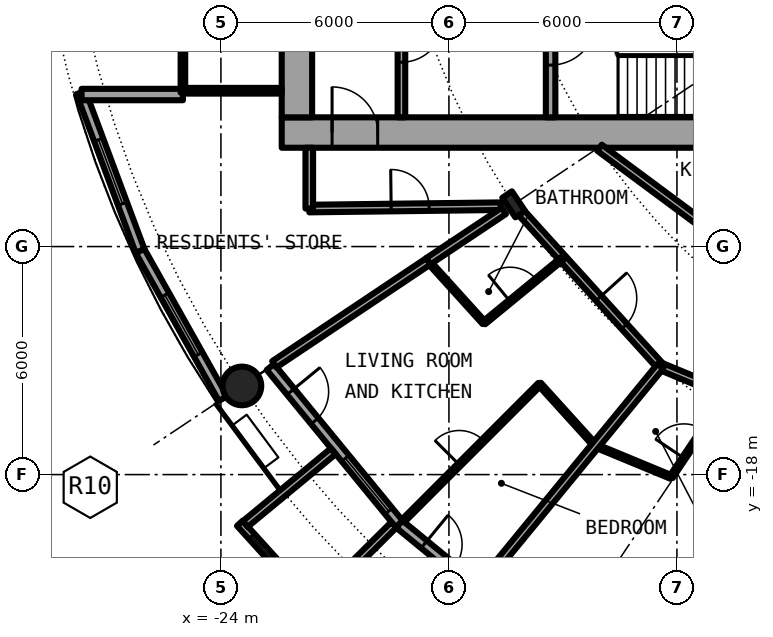
"""IFC4 building model, lengths in metres.
Left out: names, types, materials, properties, quantities, classifications, styles, units other than length and angle.
Written with IfcOpenShell. Run it as: python <this file> out.ifc"""

import sys

from ifc_helpers import new_model, si_unit, direction, frame, frame_2d, origin, origin_2d, place, context, subcontext, project, spatial, rectangle, circle, hollow_circle, i_section, extrude, element, fill, save


model = new_model("IFC4")
c1 = context("Model", 3, precision=1e-05, world=origin(), true_north=direction((0.0, 1.0)))
c2 = subcontext(c1, "Body", "Model", "MODEL_VIEW")
j1 = project(units=[si_unit("LENGTHUNIT", "METRE"), si_unit("PLANEANGLEUNIT", "RADIAN")], contexts=[c1])
p1 = place(None, origin())
s1 = spatial("IfcSite", under=j1, at=p1, CompositionType="ELEMENT")
p2 = place(p1, origin())
s2 = spatial("IfcBuilding", under=s1, at=p2, CompositionType="ELEMENT")
p3 = place(p2, frame((0.0, 0.0, 50.25)))
s3 = spatial("IfcBuildingStorey", under=s2, at=p3, CompositionType="ELEMENT", Elevation=50.25)
p4 = place(p3, frame((-23.448, -15.667, 0.0), z_axis=(0.0, 0.0, 1.0), x_axis=(1.0, 0.0, 0.0)))
e1 = element("IfcColumn", 1, at=p4, inside=s3, PredefinedType="COLUMN", context=c2, shape_type="SweptSolid", body=[
    extrude(hollow_circle(Radius=0.508, WallThickness=0.05, at=origin_2d()), origin(), (0.0, 0.0, 1.0), 3.05),
])
p5 = place(p3, frame((-16.297, -10.889, 0.0), z_axis=(0.0, 0.0, 1.0), x_axis=(-0.831469612303, -0.55557023302, 0.0)))
e2 = element("IfcColumn", 2, at=p5, inside=s3, PredefinedType="COLUMN", context=c2, shape_type="SweptSolid", body=[
    extrude(i_section(OverallWidth=0.305, OverallDepth=0.62, WebThickness=0.021, FlangeThickness=0.04, FilletRadius=0.027, at=origin_2d()), origin(), (0.0, 0.0, 1.0), 3.05),
])
p6 = place(p3, frame((-22.699, -15.167, 0.0), z_axis=(0.0, 0.0, 1.0), x_axis=(0.634382322723, -0.773019449054, 0.0)))
e3 = element("IfcWall", 3, at=p6, inside=s3, PredefinedType="SOLIDWALL", context=c2, shape_type="SweptSolid", body=[
    extrude(rectangle(XDim=5.352, YDim=0.25, at=frame_2d((2.676, 0.0))), origin(), (0.0, 0.0, 1.0), 2.7),
])
p7 = place(p6, frame((0.841, 0.0, 0.0)))
e4 = element("IfcOpeningElement", 4, at=p7, cuts=e3, PredefinedType="OPENING", context=c2, shape_type="SweptSolid", body=[
    extrude(rectangle(XDim=1.0, YDim=2.2, at=frame_2d((0.5, 1.1))), frame((0.0, 0.135, 0.0), z_axis=(0.0, -1.0, 0.0), x_axis=(1.0, 0.0, 0.0)), (0.0, 0.0, 1.0), 0.27),
])
p8 = place(p6, frame((3.111, 0.0, 0.3)))
e5 = element("IfcOpeningElement", 5, at=p8, cuts=e3, PredefinedType="OPENING", context=c2, shape_type="SweptSolid", body=[
    extrude(rectangle(XDim=1.8, YDim=2.1, at=frame_2d((0.9, 1.05))), frame((0.0, 0.135, 0.0), z_axis=(0.0, -1.0, 0.0), x_axis=(1.0, 0.0, 0.0)), (0.0, 0.0, 1.0), 0.27),
])
p9 = place(p3, frame((-23.503, -19.282, -0.03), z_axis=(0.0, 0.0, 1.0), x_axis=(0.671506829416, -0.740998365753, 0.0)))
e6 = element("IfcWall", 6, at=p9, inside=s3, PredefinedType="SOLIDWALL", context=c2, shape_type="SweptSolid", body=[
    extrude(rectangle(XDim=2.993, YDim=0.2, at=frame_2d((1.497, 0.0))), origin(), (0.0, 0.0, 1.0), 2.73),
])
p10 = place(p9, frame((0.457, 0.0, 0.33)))
e7 = element("IfcOpeningElement", 7, at=p10, cuts=e6, PredefinedType="OPENING", context=c2, shape_type="SweptSolid", body=[
    extrude(circle(Radius=1.04, at=frame_2d((1.04, 1.04))), frame((0.0, 0.11, 0.0), z_axis=(0.0, -1.0, 0.0), x_axis=(1.0, 0.0, 0.0)), (0.0, 0.0, 1.0), 0.22),
])
p11 = place(p3, frame((-21.041, -17.384, -0.03), z_axis=(0.0, 0.0, 1.0), x_axis=(-0.770784861449, -0.63709551667, 0.0)))
e8 = element("IfcWall", 8, at=p11, inside=s3, PredefinedType="SOLIDWALL", context=c2, shape_type="SweptSolid", body=[
    extrude(rectangle(XDim=3.006, YDim=0.2, at=frame_2d((1.503, 0.0))), origin(), (0.0, 0.0, 1.0), 2.73),
])
p12 = place(p3, frame((-19.45, -19.323, -0.03), z_axis=(0.0, 0.0, 1.0), x_axis=(-0.709727076896, -0.704476739375, 0.0)))
e9 = element("IfcWall", 9, at=p12, inside=s3, PredefinedType="SOLIDWALL", context=c2, shape_type="SweptSolid", body=[
    extrude(rectangle(XDim=2.883, YDim=0.2, at=frame_2d((1.441, 0.0))), origin(), (0.0, 0.0, 1.0), 2.73),
])
p13 = place(p3, frame((-19.304, -19.304, 0.0), z_axis=(0.0, 0.0, 1.0), x_axis=(0.773019449054, -0.634382322723, 0.0)))
e10 = element("IfcWall", 10, at=p13, inside=s3, PredefinedType="SOLIDWALL", context=c2, shape_type="SweptSolid", body=[
    extrude(rectangle(XDim=5.352, YDim=0.25, at=frame_2d((2.676, 0.0))), origin(), (0.0, 0.0, 1.0), 2.7),
])
p14 = place(p13, frame((0.841, 0.0, 0.0)))
e11 = element("IfcOpeningElement", 11, at=p14, cuts=e10, PredefinedType="OPENING", context=c2, shape_type="SweptSolid", body=[
    extrude(rectangle(XDim=1.0, YDim=2.2, at=frame_2d((0.5, 1.1))), frame((0.0, 0.135, 0.0), z_axis=(0.0, -1.0, 0.0), x_axis=(1.0, 0.0, 0.0)), (0.0, 0.0, 1.0), 0.27),
])
p15 = place(p13, frame((3.111, 0.0, 0.3)))
e12 = element("IfcOpeningElement", 12, at=p15, cuts=e10, PredefinedType="OPENING", context=c2, shape_type="SweptSolid", body=[
    extrude(rectangle(XDim=1.8, YDim=2.1, at=frame_2d((0.9, 1.05))), frame((0.0, 0.135, 0.0), z_axis=(0.0, -1.0, 0.0), x_axis=(1.0, 0.0, 0.0)), (0.0, 0.0, 1.0), 0.27),
])
p16 = place(p3, frame((-27.682, -7.945, 0.0), z_axis=(0.0, 0.0, 1.0), x_axis=(0.349247811493, -0.937030397675, 0.0)))
e13 = element("IfcWall", 13, at=p16, inside=s3, PredefinedType="SOLIDWALL", context=c2, shape_type="SweptSolid", body=[
    extrude(rectangle(XDim=4.452, YDim=0.25, at=frame_2d((2.226, 0.0))), origin(), (0.0, 0.0, 1.0), 2.7),
])
p17 = place(p16, frame((1.327, 0.0, 0.3)))
e14 = element("IfcOpeningElement", 14, at=p17, cuts=e13, PredefinedType="OPENING", context=c2, shape_type="SweptSolid", body=[
    extrude(rectangle(XDim=1.8, YDim=2.1, at=frame_2d((0.9, 1.05))), frame((0.0, 0.135, 0.0), z_axis=(0.0, -1.0, 0.0), x_axis=(1.0, 0.0, 0.0)), (0.0, 0.0, 1.0), 0.27),
])
p18 = place(p3, frame((-26.127, -12.117, 0.0), z_axis=(0.0, 0.0, 1.0), x_axis=(0.489696356642, -0.871893042919, 0.0)))
e15 = element("IfcWall", 15, at=p18, inside=s3, PredefinedType="SOLIDWALL", context=c2, shape_type="SweptSolid", body=[
    extrude(rectangle(XDim=4.454, YDim=0.25, at=frame_2d((2.227, 0.0))), origin(), (0.0, 0.0, 1.0), 2.7),
])
p19 = place(p18, frame((1.327, 0.0, 0.3)))
e16 = element("IfcOpeningElement", 16, at=p19, cuts=e15, PredefinedType="OPENING", context=c2, shape_type="SweptSolid", body=[
    extrude(rectangle(XDim=1.8, YDim=2.1, at=frame_2d((0.9, 1.05))), frame((0.0, 0.135, 0.0), z_axis=(0.0, -1.0, 0.0), x_axis=(1.0, 0.0, 0.0)), (0.0, 0.0, 1.0), 0.27),
])
p20 = place(p3, frame((-25.0, -8.0, 0.0), z_axis=(0.0, 0.0, 1.0), x_axis=(-1.0, 0.0, 0.0)))
e17 = element("IfcWall", 17, at=p20, inside=s3, PredefinedType="SOLIDWALL", context=c2, shape_type="SweptSolid", body=[
    extrude(rectangle(XDim=2.667, YDim=0.3, at=frame_2d((1.333, 0.0))), origin(), (0.0, 0.0, 1.0), 2.7),
])
p21 = place(p3, frame((-22.4, -9.0, 0.0), z_axis=(0.0, 0.0, 1.0), x_axis=(1.0, 0.0, 0.0)))
e18 = element("IfcWall", 18, at=p21, inside=s3, PredefinedType="SHEAR", context=c2, shape_type="SweptSolid", body=[
    extrude(rectangle(XDim=14.2, YDim=0.8, at=frame_2d((7.1, 0.0))), origin(), (0.0, 0.0, 1.0), 3.05),
])
p22 = place(p21, frame((1.325, 0.0, 0.0)))
e19 = element("IfcOpeningElement", 19, at=p22, cuts=e18, PredefinedType="OPENING", context=c2, shape_type="SweptSolid", body=[
    extrude(rectangle(XDim=1.2, YDim=2.3, at=frame_2d((0.6, 1.15))), frame((0.0, 0.41, 0.0), z_axis=(0.0, -1.0, 0.0), x_axis=(1.0, 0.0, 0.0)), (0.0, 0.0, 1.0), 0.82),
])
p23 = place(p3, frame((-22.0, -8.6, 0.0), z_axis=(0.0, 0.0, 1.0), x_axis=(0.0, 1.0, 0.0)))
e20 = element("IfcWall", 20, at=p23, inside=s3, PredefinedType="SHEAR", context=c2, shape_type="SweptSolid", body=[
    extrude(rectangle(XDim=17.2, YDim=0.8, at=frame_2d((8.6, 0.0))), origin(), (0.0, 0.0, 1.0), 3.05),
])
p24 = place(p23, frame((7.7, 0.0, 0.0)))
e21 = element("IfcOpeningElement", 21, at=p24, cuts=e20, PredefinedType="OPENING", context=c2, shape_type="SweptSolid", body=[
    extrude(rectangle(XDim=1.8, YDim=2.3, at=frame_2d((0.9, 1.15))), frame((0.0, 0.41, 0.0), z_axis=(0.0, -1.0, 0.0), x_axis=(1.0, 0.0, 0.0)), (0.0, 0.0, 1.0), 0.82),
])
p25 = place(p3, frame((-15.325, -4.65, 0.0), z_axis=(0.0, 0.0, 1.0), x_axis=(0.0, -1.0, 0.0)))
e22 = element("IfcWall", 22, at=p25, inside=s3, PredefinedType="SHEAR", context=c2, shape_type="SweptSolid", body=[
    extrude(rectangle(XDim=3.95, YDim=0.25, at=frame_2d((1.975, 0.0))), origin(), (0.0, 0.0, 1.0), 3.05),
])
p26 = place(p25, frame((1.375, 0.0, 0.0)))
e23 = element("IfcOpeningElement", 23, at=p26, cuts=e22, PredefinedType="OPENING", context=c2, shape_type="SweptSolid", body=[
    extrude(rectangle(XDim=1.2, YDim=2.3, at=frame_2d((0.6, 1.15))), frame((0.0, 0.135, 0.0), z_axis=(0.0, -1.0, 0.0), x_axis=(1.0, 0.0, 0.0)), (0.0, 0.0, 1.0), 0.27),
])
p27 = place(p3, frame((-19.25, -1.575, 0.0), z_axis=(0.0, 0.0, 1.0), x_axis=(0.0, -1.0, 0.0)))
e24 = element("IfcWall", 24, at=p27, inside=s3, PredefinedType="SOLIDWALL", context=c2, shape_type="SweptSolid", body=[
    extrude(rectangle(XDim=7.025, YDim=0.2, at=frame_2d((3.513, 0.0))), origin(), (0.0, 0.0, 1.0), 2.7),
])
p28 = place(p27, frame((4.475, 0.0, 0.0)))
e25 = element("IfcOpeningElement", 25, at=p28, cuts=e24, PredefinedType="OPENING", context=c2, shape_type="SweptSolid", body=[
    extrude(rectangle(XDim=1.1, YDim=2.3, at=frame_2d((0.55, 1.15))), frame((0.0, 0.11, 0.0), z_axis=(0.0, -1.0, 0.0), x_axis=(1.0, 0.0, 0.0)), (0.0, 0.0, 1.0), 0.22),
])
p29 = place(p3, frame((-22.4, -7.9, 0.0), z_axis=(0.0, 0.0, 1.0), x_axis=(-1.0, 0.0, 0.0)))
e26 = element("IfcWall", 26, at=p29, inside=s3, PredefinedType="PARTITIONING", context=c2, shape_type="SweptSolid", body=[
    extrude(rectangle(XDim=2.54, YDim=0.15, at=frame_2d((1.27, 0.0))), origin(), (0.0, 0.0, 1.0), 2.7),
])
p30 = place(p3, frame((-25.0, 7.95, 0.0), z_axis=(0.0, 0.0, 1.0), x_axis=(0.0, -1.0, 0.0)))
e27 = element("IfcWall", 27, at=p30, inside=s3, PredefinedType="PARTITIONING", context=c2, shape_type="SweptSolid", body=[
    extrude(rectangle(XDim=15.9, YDim=0.12, at=frame_2d((7.95, 0.0))), origin(), (0.0, 0.0, 1.0), 2.7),
])
p31 = place(p30, frame((0.95, 0.0, 0.1)))
e28 = element("IfcOpeningElement", 28, at=p31, cuts=e27, PredefinedType="OPENING", context=c2, shape_type="SweptSolid", body=[
    extrude(rectangle(XDim=14.0, YDim=2.35, at=frame_2d((7.0, 1.175))), frame((0.0, 0.07, 0.0), z_axis=(0.0, -1.0, 0.0), x_axis=(1.0, 0.0, 0.0)), (0.0, 0.0, 1.0), 0.14),
])
p32 = place(p3, frame((-18.542, -12.389, 0.0), z_axis=(0.0, 0.0, 1.0), x_axis=(0.671396556615, -0.741098282123, 0.0)))
e29 = element("IfcWall", 29, at=p32, inside=s3, PredefinedType="PARTITIONING", context=c2, shape_type="SweptSolid", body=[
    extrude(rectangle(XDim=2.182, YDim=0.1, at=frame_2d((1.091, 0.0))), origin(), (0.0, 0.0, 1.0), 2.7),
])
p33 = place(p3, frame((-15.617, -15.617, 0.0), z_axis=(0.0, 0.0, 1.0), x_axis=(0.671144831591, -0.741326254107, 0.0)))
e30 = element("IfcWall", 30, at=p33, inside=s3, PredefinedType="PARTITIONING", context=c2, shape_type="SweptSolid", body=[
    extrude(rectangle(XDim=2.181, YDim=0.1, at=frame_2d((1.091, 0.0))), origin(), (0.0, 0.0, 1.0), 2.7),
])
p34 = place(p3, frame((-14.147, -17.238, 0.0), z_axis=(0.0, 0.0, 1.0), x_axis=(0.923874819588, -0.382694810171, 0.0)))
e31 = element("IfcWall", 31, at=p34, inside=s3, PredefinedType="PARTITIONING", context=c2, shape_type="SweptSolid", body=[
    extrude(rectangle(XDim=2.158, YDim=0.1, at=frame_2d((1.079, 0.0))), origin(), (0.0, 0.0, 1.0), 2.7),
])
p35 = place(p3, frame((-16.193, -11.003, 0.0), z_axis=(0.0, 0.0, 1.0), x_axis=(0.671514934772, -0.740991020444, 0.0)))
e32 = element("IfcWall", 32, at=p35, inside=s3, PredefinedType="PARTITIONING", context=c2, shape_type="SweptSolid", body=[
    extrude(rectangle(XDim=5.598, YDim=0.2, at=frame_2d((2.799, 0.0))), origin(), (0.0, 0.0, 1.0), 2.38),
])
p36 = place(p35, frame((3.18, 0.0, 0.0)))
e33 = element("IfcOpeningElement", 33, at=p36, cuts=e32, PredefinedType="OPENING", context=c2, shape_type="SweptSolid", body=[
    extrude(rectangle(XDim=1.0, YDim=2.3, at=frame_2d((0.5, 1.15))), frame((0.0, 0.11, 0.0), z_axis=(0.0, -1.0, 0.0), x_axis=(1.0, 0.0, 0.0)), (0.0, 0.0, 1.0), 0.22),
])
p37 = place(p3, frame((-12.434, -15.151, 0.0), z_axis=(0.0, 0.0, 1.0), x_axis=(0.923888467236, -0.382661861319, 0.0)))
e34 = element("IfcWall", 34, at=p37, inside=s3, PredefinedType="PARTITIONING", context=c2, shape_type="SweptSolid", body=[
    extrude(rectangle(XDim=11.381, YDim=0.2, at=frame_2d((5.691, 0.0))), origin(), (0.0, 0.0, 1.0), 2.7),
])
p38 = place(p37, frame((3.292, 0.0, 0.0)))
e35 = element("IfcOpeningElement", 35, at=p38, cuts=e34, PredefinedType="OPENING", context=c2, shape_type="SweptSolid", body=[
    extrude(rectangle(XDim=1.0, YDim=2.3, at=frame_2d((0.5, 1.15))), frame((0.0, 0.11, 0.0), z_axis=(0.0, -1.0, 0.0), x_axis=(1.0, 0.0, 0.0)), (0.0, 0.0, 1.0), 0.22),
])
p39 = place(p3, frame((-14.037, -9.4, 0.0), z_axis=(0.0, 0.0, 1.0), x_axis=(0.803202106898, -0.595706618626, 0.0)))
e36 = element("IfcWall", 36, at=p39, inside=s3, PredefinedType="PARTITIONING", context=c2, shape_type="SweptSolid", body=[
    extrude(rectangle(XDim=11.368, YDim=0.2, at=frame_2d((5.684, 0.0))), origin(), (0.0, 0.0, 1.0), 2.7),
])
p40 = place(p39, frame((5.988, 0.0, 0.0)))
e37 = element("IfcOpeningElement", 37, at=p40, cuts=e36, PredefinedType="OPENING", context=c2, shape_type="SweptSolid", body=[
    extrude(rectangle(XDim=1.0, YDim=2.3, at=frame_2d((0.5, 1.15))), frame((0.0, 0.11, 0.0), z_axis=(0.0, -1.0, 0.0), x_axis=(1.0, 0.0, 0.0)), (0.0, 0.0, 1.0), 0.22),
])
p41 = place(p3, frame((-21.675, -11.0, 0.0), z_axis=(0.0, 0.0, 1.0), x_axis=(0.99992425795, 0.012307654658, 0.0)))
e38 = element("IfcWall", 38, at=p41, inside=s3, PredefinedType="PARTITIONING", context=c2, shape_type="SweptSolid", body=[
    extrude(rectangle(XDim=5.039, YDim=0.2, at=frame_2d((2.519, 0.0))), origin(), (0.0, 0.0, 1.0), 2.7),
])
p42 = place(p41, frame((2.155, 0.0, 0.0)))
e39 = element("IfcOpeningElement", 39, at=p42, cuts=e38, PredefinedType="OPENING", context=c2, shape_type="SweptSolid", body=[
    extrude(rectangle(XDim=1.0, YDim=2.3, at=frame_2d((0.5, 1.15))), frame((0.0, 0.11, 0.0), z_axis=(0.0, -1.0, 0.0), x_axis=(1.0, 0.0, 0.0)), (0.0, 0.0, 1.0), 0.22),
])
p43 = place(p3, frame((-18.544, -12.387, 0.0), z_axis=(0.0, 0.0, 1.0), x_axis=(0.832066006555, 0.554676627176, 0.0)))
e40 = element("IfcWall", 40, at=p43, inside=s3, PredefinedType="PARTITIONING", context=c2, shape_type="SweptSolid", body=[
    extrude(rectangle(XDim=2.39, YDim=0.2, at=frame_2d((1.195, 0.0))), origin(), (0.0, 0.0, 1.0), 2.7),
])
p44 = place(p3, frame((-22.595, -15.098, 0.0), z_axis=(0.0, 0.0, 1.0), x_axis=(0.831387096605, 0.55569370664, 0.0)))
e41 = element("IfcWall", 41, at=p44, inside=s3, PredefinedType="PARTITIONING", context=c2, shape_type="SweptSolid", body=[
    extrude(rectangle(XDim=4.875, YDim=0.2, at=frame_2d((2.438, 0.0))), origin(), (0.0, 0.0, 1.0), 2.7),
])
p45 = place(p3, frame((-19.21, -19.222, 0.0), z_axis=(0.0, 0.0, 1.0), x_axis=(0.706914880313, 0.707298629994, 0.0)))
e42 = element("IfcWall", 42, at=p45, inside=s3, PredefinedType="PARTITIONING", context=c2, shape_type="SweptSolid", body=[
    extrude(rectangle(XDim=5.09, YDim=0.1, at=frame_2d((2.545, 0.0))), origin(), (0.0, 0.0, 1.0), 2.7),
])
p46 = place(p45, frame((2.095, 0.0, 0.0)))
e43 = element("IfcOpeningElement", 43, at=p46, cuts=e42, PredefinedType="OPENING", context=c2, shape_type="SweptSolid", body=[
    extrude(rectangle(XDim=0.9, YDim=2.3, at=frame_2d((0.45, 1.15))), frame((0.0, 0.06, 0.0), z_axis=(0.0, -1.0, 0.0), x_axis=(1.0, 0.0, 0.0)), (0.0, 0.0, 1.0), 0.12),
])
p47 = place(p3, frame((-17.241, -21.006, 0.0), z_axis=(0.0, 0.0, 1.0), x_axis=(0.634381303318, 0.773020285633, 0.0)))
e44 = element("IfcWall", 44, at=p47, inside=s3, PredefinedType="PARTITIONING", context=c2, shape_type="SweptSolid", body=[
    extrude(rectangle(XDim=7.576, YDim=0.2, at=frame_2d((3.788, 0.0))), origin(), (0.0, 0.0, 1.0), 2.7),
])
p48 = place(p3, frame((-17.077, -14.006, 0.0), z_axis=(0.0, 0.0, 1.0), x_axis=(0.77319617123, 0.634166918717, 0.0)))
e45 = element("IfcWall", 45, at=p48, inside=s3, PredefinedType="PARTITIONING", context=c2, shape_type="SweptSolid", body=[
    extrude(rectangle(XDim=2.675, YDim=0.1, at=frame_2d((1.337, 0.0))), origin(), (0.0, 0.0, 1.0), 2.7),
])
p49 = place(p48, frame((0.887, 0.0, 0.0)))
e46 = element("IfcOpeningElement", 46, at=p49, cuts=e45, PredefinedType="OPENING", context=c2, shape_type="SweptSolid", body=[
    extrude(rectangle(XDim=0.9, YDim=2.3, at=frame_2d((0.45, 1.15))), frame((0.0, 0.06, 0.0), z_axis=(0.0, -1.0, 0.0), x_axis=(1.0, 0.0, 0.0)), (0.0, 0.0, 1.0), 0.12),
])
p50 = place(p3, frame((-12.153, -18.064, 0.0), z_axis=(0.0, 0.0, 1.0), x_axis=(0.558084773293, 0.829783939239, 0.0)))
e47 = element("IfcWall", 47, at=p50, inside=s3, PredefinedType="PARTITIONING", context=c2, shape_type="SweptSolid", body=[
    extrude(rectangle(XDim=1.862, YDim=0.1, at=frame_2d((0.931, 0.0))), origin(), (0.0, 0.0, 1.0), 2.7),
])
p51 = place(p50, frame((0.6, 0.0, 0.0)))
e48 = element("IfcOpeningElement", 48, at=p51, cuts=e47, PredefinedType="OPENING", context=c2, shape_type="SweptSolid", body=[
    extrude(rectangle(XDim=0.9, YDim=2.3, at=frame_2d((0.45, 1.15))), frame((0.0, 0.06, 0.0), z_axis=(0.0, -1.0, 0.0), x_axis=(1.0, 0.0, 0.0)), (0.0, 0.0, 1.0), 0.12),
])
p52 = place(p3, frame((-21.675, -11.0, 0.0), z_axis=(0.0, 0.0, 1.0), x_axis=(0.0, 1.0, 0.0)))
e49 = element("IfcWall", 49, at=p52, inside=s3, PredefinedType="PARTITIONING", context=c2, shape_type="SweptSolid", body=[
    extrude(rectangle(XDim=1.6, YDim=0.2, at=frame_2d((0.8, 0.0))), origin(), (0.0, 0.0, 1.0), 2.7),
])
p53 = place(p7, origin())
e50 = element("IfcDoor", 50, at=p53, inside=s3, OperationType="SINGLE_SWING_LEFT", PredefinedType="DOOR", context=c2, shape_type="SweptSolid", body=[
    extrude(rectangle(XDim=1.0, YDim=2.2, at=frame_2d((0.5, 1.1))), frame((0.0, 0.025, 0.0), z_axis=(0.0, -1.0, 0.0), x_axis=(1.0, 0.0, 0.0)), (0.0, 0.0, 1.0), 0.05),
])
fill(e4, e50)
p54 = place(p8, origin())
e51 = element("IfcWindow", 51, at=p54, inside=s3, PartitioningType="SINGLE_PANEL", PredefinedType="WINDOW", context=c2, shape_type="SweptSolid", body=[
    extrude(rectangle(XDim=1.8, YDim=2.1, at=frame_2d((0.9, 1.05))), frame((0.0, 0.03, 0.0), z_axis=(0.0, -1.0, 0.0), x_axis=(1.0, 0.0, 0.0)), (0.0, 0.0, 1.0), 0.06),
])
fill(e5, e51)
p55 = place(p10, origin())
e52 = element("IfcWindow", 52, at=p55, inside=s3, PartitioningType="SINGLE_PANEL", PredefinedType="WINDOW", context=c2, shape_type="SweptSolid", body=[
    extrude(circle(Radius=1.04, at=frame_2d((1.04, 1.04))), frame((0.0, 0.03, 0.0), z_axis=(0.0, -1.0, 0.0), x_axis=(1.0, 0.0, 0.0)), (0.0, 0.0, 1.0), 0.06),
])
fill(e7, e52)
p56 = place(p14, origin())
e53 = element("IfcDoor", 53, at=p56, inside=s3, OperationType="SINGLE_SWING_LEFT", PredefinedType="DOOR", context=c2, shape_type="SweptSolid", body=[
    extrude(rectangle(XDim=1.0, YDim=2.2, at=frame_2d((0.5, 1.1))), frame((0.0, 0.025, 0.0), z_axis=(0.0, -1.0, 0.0), x_axis=(1.0, 0.0, 0.0)), (0.0, 0.0, 1.0), 0.05),
])
fill(e11, e53)
p57 = place(p17, origin())
e54 = element("IfcWindow", 54, at=p57, inside=s3, PartitioningType="SINGLE_PANEL", PredefinedType="WINDOW", context=c2, shape_type="SweptSolid", body=[
    extrude(rectangle(XDim=1.8, YDim=2.1, at=frame_2d((0.9, 1.05))), frame((0.0, 0.03, 0.0), z_axis=(0.0, -1.0, 0.0), x_axis=(1.0, 0.0, 0.0)), (0.0, 0.0, 1.0), 0.06),
])
fill(e14, e54)
p58 = place(p19, origin())
e55 = element("IfcWindow", 55, at=p58, inside=s3, PartitioningType="SINGLE_PANEL", PredefinedType="WINDOW", context=c2, shape_type="SweptSolid", body=[
    extrude(rectangle(XDim=1.8, YDim=2.1, at=frame_2d((0.9, 1.05))), frame((0.0, 0.03, 0.0), z_axis=(0.0, -1.0, 0.0), x_axis=(1.0, 0.0, 0.0)), (0.0, 0.0, 1.0), 0.06),
])
fill(e16, e55)
p59 = place(p26, origin())
e56 = element("IfcDoor", 56, at=p59, inside=s3, OperationType="SINGLE_SWING_LEFT", PredefinedType="DOOR", context=c2, shape_type="SweptSolid", body=[
    extrude(rectangle(XDim=1.2, YDim=2.3, at=frame_2d((0.6, 1.15))), frame((0.0, 0.025, 0.0), z_axis=(0.0, -1.0, 0.0), x_axis=(1.0, 0.0, 0.0)), (0.0, 0.0, 1.0), 0.05),
])
fill(e23, e56)
p60 = place(p28, origin())
e57 = element("IfcDoor", 57, at=p60, inside=s3, OperationType="SINGLE_SWING_LEFT", PredefinedType="DOOR", context=c2, shape_type="SweptSolid", body=[
    extrude(rectangle(XDim=1.1, YDim=2.3, at=frame_2d((0.55, 1.15))), frame((0.0, 0.025, 0.0), z_axis=(0.0, -1.0, 0.0), x_axis=(1.0, 0.0, 0.0)), (0.0, 0.0, 1.0), 0.05),
])
fill(e25, e57)
p61 = place(p22, origin())
e58 = element("IfcDoor", 58, at=p61, inside=s3, OperationType="SINGLE_SWING_RIGHT", PredefinedType="DOOR", context=c2, shape_type="SweptSolid", body=[
    extrude(rectangle(XDim=1.2, YDim=2.3, at=frame_2d((0.6, 1.15))), frame((0.0, 0.025, 0.0), z_axis=(0.0, -1.0, 0.0), x_axis=(1.0, 0.0, 0.0)), (0.0, 0.0, 1.0), 0.05),
])
fill(e19, e58)
p62 = place(p31, origin())
e59 = element("IfcWindow", 59, at=p62, inside=s3, PartitioningType="SINGLE_PANEL", PredefinedType="WINDOW", context=c2, shape_type="SweptSolid", body=[
    extrude(rectangle(XDim=14.0, YDim=2.35, at=frame_2d((7.0, 1.175))), frame((0.0, 0.03, 0.0), z_axis=(0.0, -1.0, 0.0), x_axis=(1.0, 0.0, 0.0)), (0.0, 0.0, 1.0), 0.06),
])
fill(e28, e59)
p63 = place(p36, origin())
e60 = element("IfcDoor", 60, at=p63, inside=s3, OperationType="SINGLE_SWING_RIGHT", PredefinedType="DOOR", context=c2, shape_type="SweptSolid", body=[
    extrude(rectangle(XDim=1.0, YDim=2.3, at=frame_2d((0.5, 1.15))), frame((0.0, 0.025, 0.0), z_axis=(0.0, -1.0, 0.0), x_axis=(1.0, 0.0, 0.0)), (0.0, 0.0, 1.0), 0.05),
])
fill(e33, e60)
p64 = place(p49, origin())
e61 = element("IfcDoor", 61, at=p64, inside=s3, OperationType="SINGLE_SWING_LEFT", PredefinedType="DOOR", context=c2, shape_type="SweptSolid", body=[
    extrude(rectangle(XDim=0.9, YDim=2.3, at=frame_2d((0.45, 1.15))), frame((0.0, 0.025, 0.0), z_axis=(0.0, -1.0, 0.0), x_axis=(1.0, 0.0, 0.0)), (0.0, 0.0, 1.0), 0.05),
])
fill(e46, e61)
p65 = place(p46, origin())
e62 = element("IfcDoor", 62, at=p65, inside=s3, OperationType="SINGLE_SWING_RIGHT", PredefinedType="DOOR", context=c2, shape_type="SweptSolid", body=[
    extrude(rectangle(XDim=0.9, YDim=2.3, at=frame_2d((0.45, 1.15))), frame((0.0, 0.025, 0.0), z_axis=(0.0, -1.0, 0.0), x_axis=(1.0, 0.0, 0.0)), (0.0, 0.0, 1.0), 0.05),
])
fill(e43, e62)
p66 = place(p51, origin())
e63 = element("IfcDoor", 63, at=p66, inside=s3, OperationType="SINGLE_SWING_RIGHT", PredefinedType="DOOR", context=c2, shape_type="SweptSolid", body=[
    extrude(rectangle(XDim=0.9, YDim=2.3, at=frame_2d((0.45, 1.15))), frame((0.0, 0.025, 0.0), z_axis=(0.0, -1.0, 0.0), x_axis=(1.0, 0.0, 0.0)), (0.0, 0.0, 1.0), 0.05),
])
fill(e48, e63)
p67 = place(p42, origin())
e64 = element("IfcDoor", 64, at=p67, inside=s3, OperationType="SINGLE_SWING_RIGHT", PredefinedType="DOOR", context=c2, shape_type="SweptSolid", body=[
    extrude(rectangle(XDim=1.0, YDim=2.3, at=frame_2d((0.5, 1.15))), frame((0.0, 0.025, 0.0), z_axis=(0.0, -1.0, 0.0), x_axis=(1.0, 0.0, 0.0)), (0.0, 0.0, 1.0), 0.05),
])
fill(e39, e64)
save(model, sys.argv[1])
